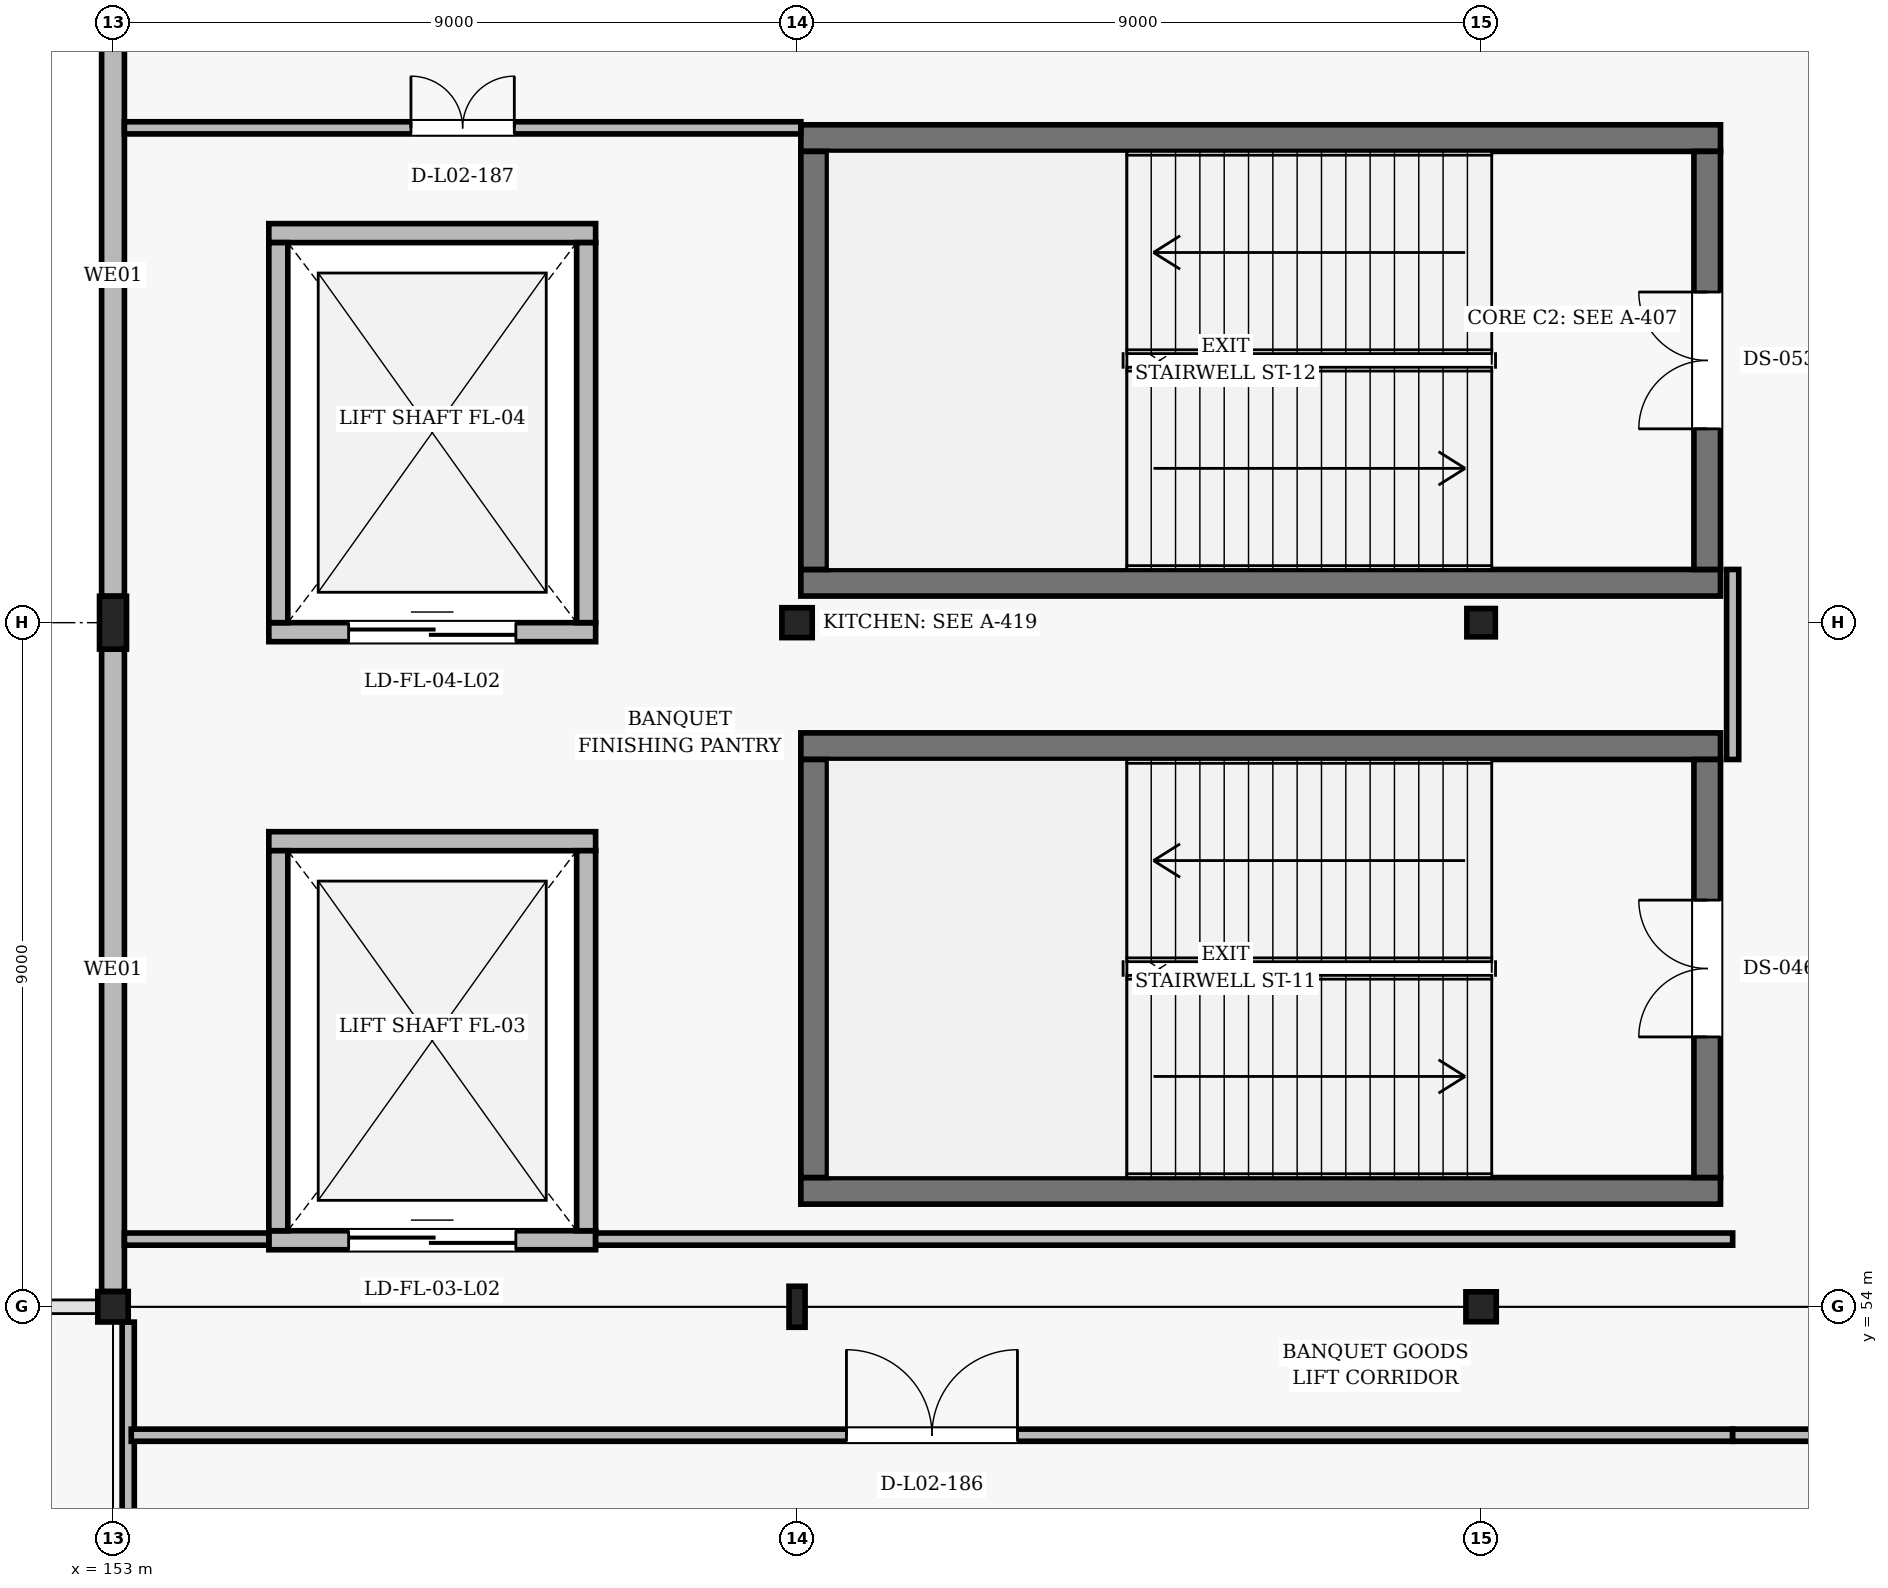
"""IFC4 building model, lengths in metres.
Left out: names, types, materials, properties, quantities, classifications, styles, units other than length and angle.
Written with IfcOpenShell. Run it as: python <this file> out.ifc"""

import sys

from ifc_helpers import new_model, si_unit, direction, frame, frame_2d, origin, origin_2d, place, context, subcontext, project, spatial, rectangle, hollow_rectangle, i_section, extrude, element, fill, save


model = new_model("IFC4")
c1 = context("Model", 3, precision=1e-05, world=origin(), true_north=direction((0.0, 1.0)))
c2 = subcontext(c1, "Body", "Model", "MODEL_VIEW")
j1 = project(units=[si_unit("LENGTHUNIT", "METRE"), si_unit("PLANEANGLEUNIT", "RADIAN")], contexts=[c1])
p1 = place(None, origin())
s1 = spatial("IfcSite", under=j1, at=p1, CompositionType="ELEMENT")
p2 = place(p1, origin())
s2 = spatial("IfcBuilding", under=s1, at=p2, CompositionType="ELEMENT")
p3 = place(p2, frame((0.0, 0.0, 10.8)))
s3 = spatial("IfcBuildingStorey", under=s2, at=p3, CompositionType="ELEMENT", Elevation=10.8)
p4 = place(p3, frame((153.0, 54.0, 0.0), z_axis=(0.0, 0.0, 1.0), x_axis=(1.0, 0.0, 0.0)))
e1 = element("IfcColumn", 1, at=p4, inside=s3, PredefinedType="COLUMN", context=c2, shape_type="SweptSolid", body=[
    extrude(hollow_rectangle(XDim=0.4, YDim=0.4, WallThickness=0.016, InnerFilletRadius=0.016, OuterFilletRadius=0.032, at=origin_2d()), origin(), (0.0, 0.0, 1.0), 4.8),
])
p5 = place(p3, frame((153.0, 63.0, 0.0), z_axis=(0.0, 0.0, 1.0), x_axis=(1.0, 0.0, 0.0)))
e2 = element("IfcColumn", 2, at=p5, inside=s3, PredefinedType="COLUMN", context=c2, shape_type="SweptSolid", body=[
    extrude(i_section(OverallWidth=0.355, OverallDepth=0.695, WebThickness=0.015, FlangeThickness=0.025, FilletRadius=0.018, at=origin_2d()), origin(), (0.0, 0.0, 1.0), 4.8),
])
p6 = place(p3, frame((162.0, 54.0, 0.0), z_axis=(0.0, 0.0, 1.0), x_axis=(1.0, 0.0, 0.0)))
e3 = element("IfcColumn", 3, at=p6, inside=s3, PredefinedType="COLUMN", context=c2, shape_type="SweptSolid", body=[
    extrude(i_section(OverallWidth=0.211, OverallDepth=0.539, WebThickness=0.012, FlangeThickness=0.019, FilletRadius=0.014, at=origin_2d()), origin(), (0.0, 0.0, 1.0), 4.8),
])
for number, where, z_axis, x_axis in (
    (4, (162.0, 63.0, 0.0), (0.0, 0.0, 1.0), (1.0, 0.0, 0.0)),
    (5, (171.0, 54.0, 0.0), (0.0, 0.0, 1.0), (1.0, 0.0, 0.0)),
):
    element("IfcColumn", number, at=place(p3, frame(where, z_axis=z_axis, x_axis=x_axis)), inside=s3, PredefinedType="COLUMN", context=c2, shape_type="SweptSolid", body=[
        extrude(i_section(OverallWidth=0.399, OverallDepth=0.393, WebThickness=0.023, FlangeThickness=0.037, FilletRadius=0.018, at=origin_2d()), origin(), (0.0, 0.0, 1.0), 4.8),
    ])
p7 = place(p3, frame((171.0, 63.0, 0.0), z_axis=(0.0, 0.0, 1.0), x_axis=(1.0, 0.0, 0.0)))
e6 = element("IfcColumn", 6, at=p7, inside=s3, PredefinedType="COLUMN", context=c2, shape_type="SweptSolid", body=[
    extrude(i_section(OverallWidth=0.374, OverallDepth=0.372, WebThickness=0.016, FlangeThickness=0.026, FilletRadius=0.016, at=origin_2d()), origin(), (0.0, 0.0, 1.0), 4.8),
])
p8 = place(p3, frame((153.0, 54.2, 0.0), z_axis=(0.0, 0.0, 1.0), x_axis=(0.0, 1.0, 0.0)))
e7 = element("IfcWall", 7, at=p8, inside=s3, PredefinedType="SOLIDWALL", context=c2, shape_type="SweptSolid", body=[
    extrude(rectangle(XDim=8.453, YDim=0.3, at=frame_2d((4.226, 0.0))), origin(), (0.0, 0.0, 1.0), 3.812),
])
p9 = place(p3, frame((153.0, 63.347, 0.0), z_axis=(0.0, 0.0, 1.0), x_axis=(0.0, 1.0, 0.0)))
e8 = element("IfcWall", 8, at=p9, inside=s3, PredefinedType="SOLIDWALL", context=c2, shape_type="SweptSolid", body=[
    extrude(rectangle(XDim=8.44, YDim=0.3, at=frame_2d((4.22, 0.0))), origin(), (0.0, 0.0, 1.0), 3.89),
])
for number, where, z_axis, x_axis in (
    (9, (162.05, 55.525, 0.0), (0.0, 0.0, 1.0), (1.0, 0.0, 0.0)),
    (10, (174.15, 61.375, 0.0), (0.0, 0.0, 1.0), (-1.0, 0.0, 0.0)),
):
    element("IfcWall", number, at=place(p3, frame(where, z_axis=z_axis, x_axis=x_axis)), inside=s3, PredefinedType="SHEAR", context=c2, shape_type="SweptSolid", body=[
        extrude(rectangle(XDim=12.1, YDim=0.35, at=frame_2d((6.05, 0.0))), origin(), (0.0, 0.0, 1.0), 4.6),
    ])
p10 = place(p3, frame((162.225, 61.2, 0.0), z_axis=(0.0, 0.0, 1.0), x_axis=(0.0, -1.0, 0.0)))
e11 = element("IfcWall", 11, at=p10, inside=s3, PredefinedType="SHEAR", context=c2, shape_type="SweptSolid", body=[
    extrude(rectangle(XDim=5.5, YDim=0.35, at=frame_2d((2.75, 0.0))), origin(), (0.0, 0.0, 1.0), 4.6),
])
p11 = place(p3, frame((173.975, 55.7, 0.0), z_axis=(0.0, 0.0, 1.0), x_axis=(0.0, 1.0, 0.0)))
e12 = element("IfcWall", 12, at=p11, inside=s3, PredefinedType="SHEAR", context=c2, shape_type="SweptSolid", body=[
    extrude(rectangle(XDim=5.5, YDim=0.35, at=frame_2d((2.75, 0.0))), origin(), (0.0, 0.0, 1.0), 4.6),
])
p12 = place(p11, frame((1.85, 0.0, 0.0)))
e13 = element("IfcOpeningElement", 13, at=p12, cuts=e12, PredefinedType="OPENING", context=c2, shape_type="SweptSolid", body=[
    extrude(rectangle(XDim=1.8, YDim=2.2, at=frame_2d((0.9, 1.1))), frame((0.0, 0.185, 0.0), z_axis=(0.0, -1.0, 0.0), x_axis=(1.0, 0.0, 0.0)), (0.0, 0.0, 1.0), 0.37),
])
for number, where, z_axis, x_axis in (
    (14, (162.05, 63.525, 0.0), (0.0, 0.0, 1.0), (1.0, 0.0, 0.0)),
    (15, (174.15, 69.375, 0.0), (0.0, 0.0, 1.0), (-1.0, 0.0, 0.0)),
):
    element("IfcWall", number, at=place(p3, frame(where, z_axis=z_axis, x_axis=x_axis)), inside=s3, PredefinedType="SHEAR", context=c2, shape_type="SweptSolid", body=[
        extrude(rectangle(XDim=12.1, YDim=0.35, at=frame_2d((6.05, 0.0))), origin(), (0.0, 0.0, 1.0), 4.6),
    ])
p13 = place(p3, frame((162.225, 69.2, 0.0), z_axis=(0.0, 0.0, 1.0), x_axis=(0.0, -1.0, 0.0)))
e16 = element("IfcWall", 16, at=p13, inside=s3, PredefinedType="SHEAR", context=c2, shape_type="SweptSolid", body=[
    extrude(rectangle(XDim=5.5, YDim=0.35, at=frame_2d((2.75, 0.0))), origin(), (0.0, 0.0, 1.0), 4.6),
])
p14 = place(p3, frame((173.975, 63.7, 0.0), z_axis=(0.0, 0.0, 1.0), x_axis=(0.0, 1.0, 0.0)))
e17 = element("IfcWall", 17, at=p14, inside=s3, PredefinedType="SHEAR", context=c2, shape_type="SweptSolid", body=[
    extrude(rectangle(XDim=5.5, YDim=0.35, at=frame_2d((2.75, 0.0))), origin(), (0.0, 0.0, 1.0), 4.6),
])
p15 = place(p14, frame((1.85, 0.0, 0.0)))
e18 = element("IfcOpeningElement", 18, at=p15, cuts=e17, PredefinedType="OPENING", context=c2, shape_type="SweptSolid", body=[
    extrude(rectangle(XDim=1.8, YDim=2.2, at=frame_2d((0.9, 1.1))), frame((0.0, 0.185, 0.0), z_axis=(0.0, -1.0, 0.0), x_axis=(1.0, 0.0, 0.0)), (0.0, 0.0, 1.0), 0.37),
])
p16 = place(p3, frame((155.05, 54.875, 0.0), z_axis=(0.0, 0.0, 1.0), x_axis=(1.0, 0.0, 0.0)))
e19 = element("IfcWall", 19, at=p16, inside=s3, PredefinedType="SOLIDWALL", context=c2, shape_type="SweptSolid", body=[
    extrude(rectangle(XDim=4.3, YDim=0.25, at=frame_2d((2.15, 0.0))), origin(), (0.0, 0.0, 1.0), 4.6),
])
p17 = place(p16, frame((1.05, 0.0, 0.0)))
e20 = element("IfcOpeningElement", 20, at=p17, cuts=e19, PredefinedType="OPENING", context=c2, shape_type="SweptSolid", body=[
    extrude(rectangle(XDim=2.2, YDim=2.5, at=frame_2d((1.1, 1.25))), frame((0.0, 0.135, 0.0), z_axis=(0.0, -1.0, 0.0), x_axis=(1.0, 0.0, 0.0)), (0.0, 0.0, 1.0), 0.27),
])
p18 = place(p3, frame((159.35, 60.125, 0.0), z_axis=(0.0, 0.0, 1.0), x_axis=(-1.0, 0.0, 0.0)))
e21 = element("IfcWall", 21, at=p18, inside=s3, PredefinedType="SOLIDWALL", context=c2, shape_type="SweptSolid", body=[
    extrude(rectangle(XDim=4.3, YDim=0.25, at=frame_2d((2.15, 0.0))), origin(), (0.0, 0.0, 1.0), 4.6),
])
for number, where, z_axis, x_axis in (
    (22, (155.175, 60.0, 0.0), (0.0, 0.0, 1.0), (0.0, -1.0, 0.0)),
    (23, (159.225, 55.0, 0.0), (0.0, 0.0, 1.0), (0.0, 1.0, 0.0)),
):
    element("IfcWall", number, at=place(p3, frame(where, z_axis=z_axis, x_axis=x_axis)), inside=s3, PredefinedType="SOLIDWALL", context=c2, shape_type="SweptSolid", body=[
        extrude(rectangle(XDim=5.0, YDim=0.25, at=frame_2d((2.5, 0.0))), origin(), (0.0, 0.0, 1.0), 4.6),
    ])
p19 = place(p3, frame((155.05, 62.875, 0.0), z_axis=(0.0, 0.0, 1.0), x_axis=(1.0, 0.0, 0.0)))
e24 = element("IfcWall", 24, at=p19, inside=s3, PredefinedType="SOLIDWALL", context=c2, shape_type="SweptSolid", body=[
    extrude(rectangle(XDim=4.3, YDim=0.25, at=frame_2d((2.15, 0.0))), origin(), (0.0, 0.0, 1.0), 4.6),
])
p20 = place(p19, frame((1.05, 0.0, 0.0)))
e25 = element("IfcOpeningElement", 25, at=p20, cuts=e24, PredefinedType="OPENING", context=c2, shape_type="SweptSolid", body=[
    extrude(rectangle(XDim=2.2, YDim=2.5, at=frame_2d((1.1, 1.25))), frame((0.0, 0.135, 0.0), z_axis=(0.0, -1.0, 0.0), x_axis=(1.0, 0.0, 0.0)), (0.0, 0.0, 1.0), 0.27),
])
p21 = place(p3, frame((159.35, 68.125, 0.0), z_axis=(0.0, 0.0, 1.0), x_axis=(-1.0, 0.0, 0.0)))
e26 = element("IfcWall", 26, at=p21, inside=s3, PredefinedType="SOLIDWALL", context=c2, shape_type="SweptSolid", body=[
    extrude(rectangle(XDim=4.3, YDim=0.25, at=frame_2d((2.15, 0.0))), origin(), (0.0, 0.0, 1.0), 4.6),
])
for number, where, z_axis, x_axis in (
    (27, (155.175, 68.0, 0.0), (0.0, 0.0, 1.0), (0.0, -1.0, 0.0)),
    (28, (159.225, 63.0, 0.0), (0.0, 0.0, 1.0), (0.0, 1.0, 0.0)),
):
    element("IfcWall", number, at=place(p3, frame(where, z_axis=z_axis, x_axis=x_axis)), inside=s3, PredefinedType="SOLIDWALL", context=c2, shape_type="SweptSolid", body=[
        extrude(rectangle(XDim=5.0, YDim=0.25, at=frame_2d((2.5, 0.0))), origin(), (0.0, 0.0, 1.0), 4.6),
    ])
p22 = place(p3, frame((153.2, 53.798, 0.0), z_axis=(0.0, 0.0, 1.0), x_axis=(0.0, -1.0, 0.0)))
e29 = element("IfcWall", 29, at=p22, inside=s3, PredefinedType="PARTITIONING", context=c2, shape_type="SweptSolid", body=[
    extrude(rectangle(XDim=9.098, YDim=0.16, at=frame_2d((4.549, 0.0))), origin(), (0.0, 0.0, 1.0), 3.673),
])
p23 = place(p3, frame((153.24, 52.31, 0.0), z_axis=(0.0, 0.0, 1.0), x_axis=(1.0, 0.0, 0.0)))
e30 = element("IfcWall", 30, at=p23, inside=s3, PredefinedType="PARTITIONING", context=c2, shape_type="SweptSolid", body=[
    extrude(rectangle(XDim=21.07, YDim=0.16, at=frame_2d((10.535, 0.0))), origin(), (0.0, 0.0, 1.0), 3.73),
])
p24 = place(p23, frame((9.41, 0.0, 0.0)))
e31 = element("IfcOpeningElement", 31, at=p24, cuts=e30, PredefinedType="OPENING", context=c2, shape_type="SweptSolid", body=[
    extrude(rectangle(XDim=2.25, YDim=2.4, at=frame_2d((1.125, 1.2))), frame((0.0, 0.09, 0.0), z_axis=(0.0, -1.0, 0.0), x_axis=(1.0, 0.0, 0.0)), (0.0, 0.0, 1.0), 0.18),
])
p25 = place(p3, frame((174.31, 52.31, 0.0), z_axis=(0.0, 0.0, 1.0), x_axis=(1.0, 0.0, 0.0)))
e32 = element("IfcWall", 32, at=p25, inside=s3, PredefinedType="PARTITIONING", context=c2, shape_type="SweptSolid", body=[
    extrude(rectangle(XDim=4.94, YDim=0.16, at=frame_2d((2.47, 0.0))), origin(), (0.0, 0.0, 1.0), 4.128),
])
p26 = place(p3, frame((153.15, 69.51, 0.0), z_axis=(0.0, 0.0, 1.0), x_axis=(1.0, 0.0, 0.0)))
e33 = element("IfcWall", 33, at=p26, inside=s3, PredefinedType="PARTITIONING", context=c2, shape_type="SweptSolid", body=[
    extrude(rectangle(XDim=8.9, YDim=0.16, at=frame_2d((4.45, 0.0))), origin(), (0.0, 0.0, 1.0), 3.812),
])
p27 = place(p26, frame((3.77, 0.0, 0.0)))
e34 = element("IfcOpeningElement", 34, at=p27, cuts=e33, PredefinedType="OPENING", context=c2, shape_type="SweptSolid", body=[
    extrude(rectangle(XDim=1.36, YDim=2.28, at=frame_2d((0.68, 1.14))), frame((0.0, 0.09, 0.0), z_axis=(0.0, -1.0, 0.0), x_axis=(1.0, 0.0, 0.0)), (0.0, 0.0, 1.0), 0.18),
])
p28 = place(p3, frame((174.31, 63.7, 0.0), z_axis=(0.0, 0.0, 1.0), x_axis=(0.0, -1.0, 0.0)))
e35 = element("IfcWall", 35, at=p28, inside=s3, PredefinedType="PARTITIONING", context=c2, shape_type="SweptSolid", body=[
    extrude(rectangle(XDim=2.5, YDim=0.16, at=frame_2d((1.25, 0.0))), origin(), (0.0, 0.0, 1.0), 3.812),
])
p29 = place(p3, frame((174.31, 54.89, 0.0), z_axis=(0.0, 0.0, 1.0), x_axis=(-1.0, 0.0, 0.0)))
e36 = element("IfcWall", 36, at=p29, inside=s3, PredefinedType="PARTITIONING", context=c2, shape_type="SweptSolid", body=[
    extrude(rectangle(XDim=14.96, YDim=0.16, at=frame_2d((7.48, 0.0))), origin(), (0.0, 0.0, 1.0), 3.974),
])
p30 = place(p3, frame((155.05, 54.89, 0.0), z_axis=(0.0, 0.0, 1.0), x_axis=(-1.0, 0.0, 0.0)))
e37 = element("IfcWall", 37, at=p30, inside=s3, PredefinedType="PARTITIONING", context=c2, shape_type="SweptSolid", body=[
    extrude(rectangle(XDim=1.9, YDim=0.16, at=frame_2d((0.95, 0.0))), origin(), (0.0, 0.0, 1.0), 3.812),
])
p31 = place(p12, origin())
e38 = element("IfcDoor", 38, at=p31, inside=s3, OperationType="DOUBLE_DOOR_SINGLE_SWING", PredefinedType="DOOR", context=c2, shape_type="SweptSolid", body=[
    extrude(rectangle(XDim=1.8, YDim=2.2, at=frame_2d((0.9, 1.1))), frame((0.0, 0.025, 0.0), z_axis=(0.0, -1.0, 0.0), x_axis=(1.0, 0.0, 0.0)), (0.0, 0.0, 1.0), 0.05),
])
fill(e13, e38)
p32 = place(p15, origin())
e39 = element("IfcDoor", 39, at=p32, inside=s3, OperationType="DOUBLE_DOOR_SINGLE_SWING", PredefinedType="DOOR", context=c2, shape_type="SweptSolid", body=[
    extrude(rectangle(XDim=1.8, YDim=2.2, at=frame_2d((0.9, 1.1))), frame((0.0, 0.025, 0.0), z_axis=(0.0, -1.0, 0.0), x_axis=(1.0, 0.0, 0.0)), (0.0, 0.0, 1.0), 0.05),
])
fill(e18, e39)
p33 = place(p17, origin())
e40 = element("IfcDoor", 40, at=p33, inside=s3, OperationType="DOUBLE_DOOR_SLIDING", PredefinedType="DOOR", context=c2, shape_type="SweptSolid", body=[
    extrude(rectangle(XDim=2.2, YDim=2.5, at=frame_2d((1.1, 1.25))), frame((0.0, 0.025, 0.0), z_axis=(0.0, -1.0, 0.0), x_axis=(1.0, 0.0, 0.0)), (0.0, 0.0, 1.0), 0.05),
])
fill(e20, e40)
p34 = place(p20, origin())
e41 = element("IfcDoor", 41, at=p34, inside=s3, OperationType="DOUBLE_DOOR_SLIDING", PredefinedType="DOOR", context=c2, shape_type="SweptSolid", body=[
    extrude(rectangle(XDim=2.2, YDim=2.5, at=frame_2d((1.1, 1.25))), frame((0.0, 0.025, 0.0), z_axis=(0.0, -1.0, 0.0), x_axis=(1.0, 0.0, 0.0)), (0.0, 0.0, 1.0), 0.05),
])
fill(e25, e41)
p35 = place(p24, origin())
e42 = element("IfcDoor", 42, at=p35, inside=s3, OperationType="DOUBLE_DOOR_SINGLE_SWING", PredefinedType="DOOR", context=c2, shape_type="SweptSolid", body=[
    extrude(rectangle(XDim=2.25, YDim=2.4, at=frame_2d((1.125, 1.2))), frame((0.0, 0.025, 0.0), z_axis=(0.0, -1.0, 0.0), x_axis=(1.0, 0.0, 0.0)), (0.0, 0.0, 1.0), 0.05),
])
fill(e31, e42)
p36 = place(p27, origin())
e43 = element("IfcDoor", 43, at=p36, inside=s3, OperationType="DOUBLE_DOOR_SINGLE_SWING", PredefinedType="DOOR", context=c2, shape_type="SweptSolid", body=[
    extrude(rectangle(XDim=1.36, YDim=2.28, at=frame_2d((0.68, 1.14))), frame((0.0, 0.025, 0.0), z_axis=(0.0, -1.0, 0.0), x_axis=(1.0, 0.0, 0.0)), (0.0, 0.0, 1.0), 0.05),
])
fill(e34, e43)
save(model, sys.argv[1])
